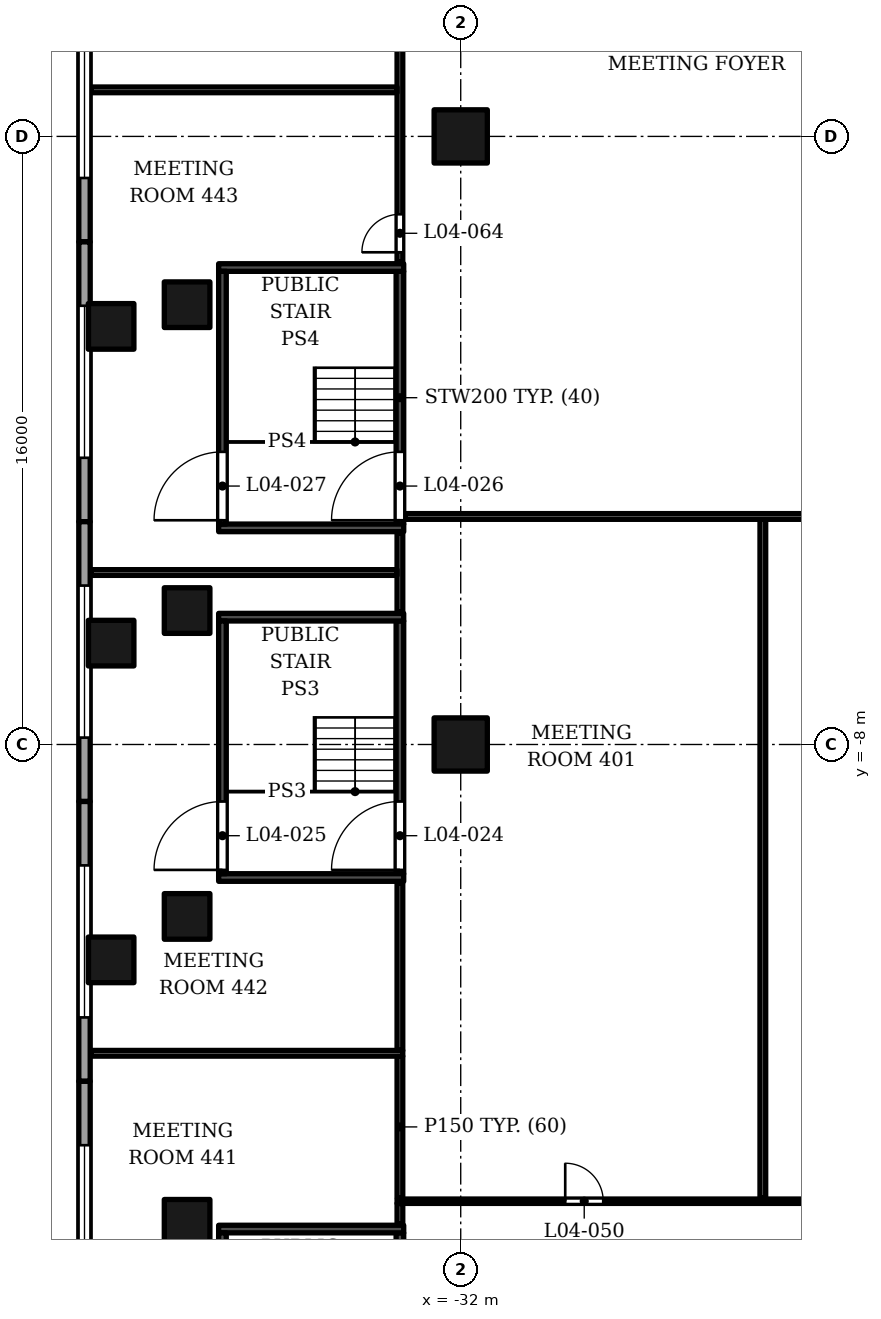
"""IFC4 building model, lengths in metres.
Left out: names, types, materials, properties, quantities, classifications, styles, units other than length and angle.
Written with IfcOpenShell. Run it as: python <this file> out.ifc"""

import sys

from ifc_helpers import new_model, si_unit, direction, frame, frame_2d, origin, origin_2d, place, context, subcontext, project, spatial, rectangle, extrude, element, fill, save


model = new_model("IFC4")
c1 = context("Model", 3, precision=1e-05, world=origin(), true_north=direction((0.0, 1.0)))
c2 = subcontext(c1, "Body", "Model", "MODEL_VIEW")
j1 = project(units=[si_unit("LENGTHUNIT", "METRE"), si_unit("PLANEANGLEUNIT", "RADIAN")], contexts=[c1])
p1 = place(None, origin())
s1 = spatial("IfcSite", under=j1, at=p1, CompositionType="ELEMENT")
p2 = place(p1, origin())
s2 = spatial("IfcBuilding", under=s1, at=p2, CompositionType="ELEMENT")
p3 = place(p2, frame((0.0, 0.0, 34.5)))
s3 = spatial("IfcBuildingStorey", under=s2, at=p3, CompositionType="ELEMENT", Elevation=34.5)
for number, where, z_axis, x_axis in (
    (1, (-32.0, -8.0, 0.0), (0.0, 0.0, 1.0), (1.0, 0.0, 0.0)),
    (2, (-32.0, 8.0, 0.0), (0.0, 0.0, 1.0), (1.0, 0.0, 0.0)),
):
    element("IfcColumn", number, at=place(p3, frame(where, z_axis=z_axis, x_axis=x_axis)), inside=s3, PredefinedType="COLUMN", context=c2, shape_type="SweptSolid", body=[
        extrude(rectangle(XDim=1.4, YDim=1.4, at=origin_2d()), origin(), (0.0, 0.0, 1.0), 5.5),
    ])
for number, where, z_axis, x_axis in (
    (3, (-39.2, -20.572, 0.0), (0.0, 0.0, 1.0), (1.0, 0.0, 0.0)),
    (4, (-39.2, -12.524, 0.0), (0.0, 0.0, 1.0), (1.0, 0.0, 0.0)),
    (5, (-39.2, -4.476, 0.0), (0.0, 0.0, 1.0), (1.0, 0.0, 0.0)),
    (6, (-39.2, 3.572, 0.0), (0.0, 0.0, 1.0), (1.0, 0.0, 0.0)),
    (7, (-41.2, -13.667, 0.0), (0.0, 0.0, 1.0), (1.0, 0.0, 0.0)),
    (8, (-41.2, -5.333, 0.0), (0.0, 0.0, 1.0), (1.0, 0.0, 0.0)),
    (9, (-41.2, 3.001, 0.0), (0.0, 0.0, 1.0), (1.0, 0.0, 0.0)),
):
    element("IfcColumn", number, at=place(p3, frame(where, z_axis=z_axis, x_axis=x_axis)), inside=s3, PredefinedType="COLUMN", context=c2, shape_type="SweptSolid", body=[
        extrude(rectangle(XDim=1.2, YDim=1.2, at=origin_2d()), origin(), (0.0, 0.0, 1.0), 5.5),
    ])
p4 = place(p3, frame((-41.9, 12.587, 0.0), z_axis=(0.0, 0.0, 1.0), x_axis=(0.0, -1.0, 0.0)))
e10 = element("IfcWall", 10, at=p4, inside=s3, PredefinedType="SOLIDWALL", context=c2, shape_type="SweptSolid", body=[
    extrude(rectangle(XDim=7.362, YDim=0.3, at=frame_2d((3.681, 0.0))), origin(), (0.0, 0.0, 1.0), 4.1),
])
p5 = place(p4, frame((1.681, 0.0, 1.0)))
e11 = element("IfcOpeningElement", 11, at=p5, cuts=e10, PredefinedType="OPENING", context=c2, shape_type="SweptSolid", body=[
    extrude(rectangle(XDim=4.0, YDim=1.8, at=frame_2d((2.0, 0.9))), frame((0.0, 0.16, 0.0), z_axis=(0.0, -1.0, 0.0), x_axis=(1.0, 0.0, 0.0)), (0.0, 0.0, 1.0), 0.32),
])
p6 = place(p3, frame((-41.9, 5.225, 0.0), z_axis=(0.0, 0.0, 1.0), x_axis=(0.0, -1.0, 0.0)))
e12 = element("IfcWall", 12, at=p6, inside=s3, PredefinedType="SOLIDWALL", context=c2, shape_type="SweptSolid", body=[
    extrude(rectangle(XDim=7.363, YDim=0.3, at=frame_2d((3.681, 0.0))), origin(), (0.0, 0.0, 1.0), 4.1),
])
p7 = place(p6, frame((1.681, 0.0, 1.0)))
e13 = element("IfcOpeningElement", 13, at=p7, cuts=e12, PredefinedType="OPENING", context=c2, shape_type="SweptSolid", body=[
    extrude(rectangle(XDim=4.0, YDim=1.8, at=frame_2d((2.0, 0.9))), frame((0.0, 0.16, 0.0), z_axis=(0.0, -1.0, 0.0), x_axis=(1.0, 0.0, 0.0)), (0.0, 0.0, 1.0), 0.32),
])
p8 = place(p3, frame((-41.9, -2.137, 0.0), z_axis=(0.0, 0.0, 1.0), x_axis=(0.0, -1.0, 0.0)))
e14 = element("IfcWall", 14, at=p8, inside=s3, PredefinedType="SOLIDWALL", context=c2, shape_type="SweptSolid", body=[
    extrude(rectangle(XDim=7.363, YDim=0.3, at=frame_2d((3.681, 0.0))), origin(), (0.0, 0.0, 1.0), 4.1),
])
p9 = place(p8, frame((1.681, 0.0, 1.0)))
e15 = element("IfcOpeningElement", 15, at=p9, cuts=e14, PredefinedType="OPENING", context=c2, shape_type="SweptSolid", body=[
    extrude(rectangle(XDim=4.0, YDim=1.8, at=frame_2d((2.0, 0.9))), frame((0.0, 0.16, 0.0), z_axis=(0.0, -1.0, 0.0), x_axis=(1.0, 0.0, 0.0)), (0.0, 0.0, 1.0), 0.32),
])
p10 = place(p3, frame((-41.9, -9.5, 0.0), z_axis=(0.0, 0.0, 1.0), x_axis=(0.0, -1.0, 0.0)))
e16 = element("IfcWall", 16, at=p10, inside=s3, PredefinedType="SOLIDWALL", context=c2, shape_type="SweptSolid", body=[
    extrude(rectangle(XDim=7.363, YDim=0.3, at=frame_2d((3.681, 0.0))), origin(), (0.0, 0.0, 1.0), 4.1),
])
p11 = place(p10, frame((1.681, 0.0, 1.0)))
e17 = element("IfcOpeningElement", 17, at=p11, cuts=e16, PredefinedType="OPENING", context=c2, shape_type="SweptSolid", body=[
    extrude(rectangle(XDim=4.0, YDim=1.8, at=frame_2d((2.0, 0.9))), frame((0.0, 0.16, 0.0), z_axis=(0.0, -1.0, 0.0), x_axis=(1.0, 0.0, 0.0)), (0.0, 0.0, 1.0), 0.32),
])
p12 = place(p3, frame((-41.9, -16.863, 0.0), z_axis=(0.0, 0.0, 1.0), x_axis=(0.0, -1.0, 0.0)))
e18 = element("IfcWall", 18, at=p12, inside=s3, PredefinedType="SOLIDWALL", context=c2, shape_type="SweptSolid", body=[
    extrude(rectangle(XDim=7.363, YDim=0.3, at=frame_2d((3.681, 0.0))), origin(), (0.0, 0.0, 1.0), 4.1),
])
p13 = place(p12, frame((1.681, 0.0, 1.0)))
e19 = element("IfcOpeningElement", 19, at=p13, cuts=e18, PredefinedType="OPENING", context=c2, shape_type="SweptSolid", body=[
    extrude(rectangle(XDim=4.0, YDim=1.8, at=frame_2d((2.0, 0.9))), frame((0.0, 0.16, 0.0), z_axis=(0.0, -1.0, 0.0), x_axis=(1.0, 0.0, 0.0)), (0.0, 0.0, 1.0), 0.32),
])
for number, where, z_axis, x_axis in (
    (20, (-41.85, 19.79, 5.5), (0.0, 0.0, 1.0), (0.0, -1.0, 0.0)),
    (21, (-41.85, 5.093, 5.5), (0.0, 0.0, 1.0), (0.0, -1.0, 0.0)),
    (22, (-41.85, -9.605, 5.5), (0.0, 0.0, 1.0), (0.0, -1.0, 0.0)),
):
    element("IfcWall", number, at=place(p3, frame(where, z_axis=z_axis, x_axis=x_axis)), inside=s3, PredefinedType="PARAPET", context=c2, shape_type="SweptSolid", body=[
        extrude(rectangle(XDim=14.698, YDim=0.3, at=frame_2d((7.349, 0.0))), origin(), (0.0, 0.0, 1.0), 1.1),
    ])
p14 = place(p3, frame((-38.37, -20.75, 0.0), z_axis=(0.0, 0.0, 1.0), x_axis=(1.0, 0.0, 0.0)))
e23 = element("IfcWall", 23, at=p14, inside=s3, PredefinedType="SOLIDWALL", context=c2, shape_type="SweptSolid", body=[
    extrude(rectangle(XDim=4.87, YDim=0.2, at=frame_2d((2.435, 0.0))), origin(), (0.0, 0.0, 1.0), 5.05),
])
p15 = place(p3, frame((-38.27, -27.5, 0.0), z_axis=(0.0, 0.0, 1.0), x_axis=(0.0, 1.0, 0.0)))
e24 = element("IfcWall", 24, at=p15, inside=s3, PredefinedType="SOLIDWALL", context=c2, shape_type="SweptSolid", body=[
    extrude(rectangle(XDim=6.65, YDim=0.2, at=frame_2d((3.325, 0.0))), origin(), (0.0, 0.0, 1.0), 5.05),
])
p16 = place(p15, frame((0.1, 0.0, 0.0)))
e25 = element("IfcOpeningElement", 25, at=p16, cuts=e24, PredefinedType="OPENING", context=c2, shape_type="SweptSolid", body=[
    extrude(rectangle(XDim=1.8, YDim=2.4, at=frame_2d((0.9, 1.2))), frame((0.0, 0.11, 0.0), z_axis=(0.0, -1.0, 0.0), x_axis=(1.0, 0.0, 0.0)), (0.0, 0.0, 1.0), 0.22),
])
p17 = place(p3, frame((-33.6, -27.5, 0.0), z_axis=(0.0, 0.0, 1.0), x_axis=(0.0, 1.0, 0.0)))
e26 = element("IfcWall", 26, at=p17, inside=s3, PredefinedType="SOLIDWALL", context=c2, shape_type="SweptSolid", body=[
    extrude(rectangle(XDim=6.65, YDim=0.2, at=frame_2d((3.325, 0.0))), origin(), (0.0, 0.0, 1.0), 5.05),
])
p18 = place(p17, frame((0.1, 0.0, 0.0)))
e27 = element("IfcOpeningElement", 27, at=p18, cuts=e26, PredefinedType="OPENING", context=c2, shape_type="SweptSolid", body=[
    extrude(rectangle(XDim=1.8, YDim=2.4, at=frame_2d((0.9, 1.2))), frame((0.0, 0.11, 0.0), z_axis=(0.0, -1.0, 0.0), x_axis=(1.0, 0.0, 0.0)), (0.0, 0.0, 1.0), 0.22),
])
for number, where, z_axis, x_axis in (
    (28, (-38.37, -11.5, 0.0), (0.0, 0.0, 1.0), (1.0, 0.0, 0.0)),
    (29, (-38.37, -4.65, 0.0), (0.0, 0.0, 1.0), (1.0, 0.0, 0.0)),
):
    element("IfcWall", number, at=place(p3, frame(where, z_axis=z_axis, x_axis=x_axis)), inside=s3, PredefinedType="SOLIDWALL", context=c2, shape_type="SweptSolid", body=[
        extrude(rectangle(XDim=4.87, YDim=0.2, at=frame_2d((2.435, 0.0))), origin(), (0.0, 0.0, 1.0), 5.05),
    ])
p19 = place(p3, frame((-38.27, -11.4, 0.0), z_axis=(0.0, 0.0, 1.0), x_axis=(0.0, 1.0, 0.0)))
e30 = element("IfcWall", 30, at=p19, inside=s3, PredefinedType="SOLIDWALL", context=c2, shape_type="SweptSolid", body=[
    extrude(rectangle(XDim=6.65, YDim=0.2, at=frame_2d((3.325, 0.0))), origin(), (0.0, 0.0, 1.0), 5.05),
])
p20 = place(p19, frame((0.1, 0.0, 0.0)))
e31 = element("IfcOpeningElement", 31, at=p20, cuts=e30, PredefinedType="OPENING", context=c2, shape_type="SweptSolid", body=[
    extrude(rectangle(XDim=1.8, YDim=2.4, at=frame_2d((0.9, 1.2))), frame((0.0, 0.11, 0.0), z_axis=(0.0, -1.0, 0.0), x_axis=(1.0, 0.0, 0.0)), (0.0, 0.0, 1.0), 0.22),
])
p21 = place(p3, frame((-33.6, -11.4, 0.0), z_axis=(0.0, 0.0, 1.0), x_axis=(0.0, 1.0, 0.0)))
e32 = element("IfcWall", 32, at=p21, inside=s3, PredefinedType="SOLIDWALL", context=c2, shape_type="SweptSolid", body=[
    extrude(rectangle(XDim=6.65, YDim=0.2, at=frame_2d((3.325, 0.0))), origin(), (0.0, 0.0, 1.0), 5.05),
])
p22 = place(p21, frame((0.1, 0.0, 0.0)))
e33 = element("IfcOpeningElement", 33, at=p22, cuts=e32, PredefinedType="OPENING", context=c2, shape_type="SweptSolid", body=[
    extrude(rectangle(XDim=1.8, YDim=2.4, at=frame_2d((0.9, 1.2))), frame((0.0, 0.11, 0.0), z_axis=(0.0, -1.0, 0.0), x_axis=(1.0, 0.0, 0.0)), (0.0, 0.0, 1.0), 0.22),
])
for number, where, z_axis, x_axis in (
    (34, (-38.37, -2.3, 0.0), (0.0, 0.0, 1.0), (1.0, 0.0, 0.0)),
    (35, (-38.37, 4.55, 0.0), (0.0, 0.0, 1.0), (1.0, 0.0, 0.0)),
):
    element("IfcWall", number, at=place(p3, frame(where, z_axis=z_axis, x_axis=x_axis)), inside=s3, PredefinedType="SOLIDWALL", context=c2, shape_type="SweptSolid", body=[
        extrude(rectangle(XDim=4.87, YDim=0.2, at=frame_2d((2.435, 0.0))), origin(), (0.0, 0.0, 1.0), 5.05),
    ])
p23 = place(p3, frame((-38.27, -2.2, 0.0), z_axis=(0.0, 0.0, 1.0), x_axis=(0.0, 1.0, 0.0)))
e36 = element("IfcWall", 36, at=p23, inside=s3, PredefinedType="SOLIDWALL", context=c2, shape_type="SweptSolid", body=[
    extrude(rectangle(XDim=6.65, YDim=0.2, at=frame_2d((3.325, 0.0))), origin(), (0.0, 0.0, 1.0), 5.05),
])
p24 = place(p23, frame((0.1, 0.0, 0.0)))
e37 = element("IfcOpeningElement", 37, at=p24, cuts=e36, PredefinedType="OPENING", context=c2, shape_type="SweptSolid", body=[
    extrude(rectangle(XDim=1.8, YDim=2.4, at=frame_2d((0.9, 1.2))), frame((0.0, 0.11, 0.0), z_axis=(0.0, -1.0, 0.0), x_axis=(1.0, 0.0, 0.0)), (0.0, 0.0, 1.0), 0.22),
])
p25 = place(p3, frame((-33.6, -2.2, 0.0), z_axis=(0.0, 0.0, 1.0), x_axis=(0.0, 1.0, 0.0)))
e38 = element("IfcWall", 38, at=p25, inside=s3, PredefinedType="SOLIDWALL", context=c2, shape_type="SweptSolid", body=[
    extrude(rectangle(XDim=6.65, YDim=0.2, at=frame_2d((3.325, 0.0))), origin(), (0.0, 0.0, 1.0), 5.05),
])
p26 = place(p25, frame((0.1, 0.0, 0.0)))
e39 = element("IfcOpeningElement", 39, at=p26, cuts=e38, PredefinedType="OPENING", context=c2, shape_type="SweptSolid", body=[
    extrude(rectangle(XDim=1.8, YDim=2.4, at=frame_2d((0.9, 1.2))), frame((0.0, 0.11, 0.0), z_axis=(0.0, -1.0, 0.0), x_axis=(1.0, 0.0, 0.0)), (0.0, 0.0, 1.0), 0.22),
])
p27 = place(p3, frame((-33.6, -20.61, 0.0), z_axis=(0.0, 0.0, 1.0), x_axis=(0.0, 1.0, 0.0)))
e40 = element("IfcWall", 40, at=p27, inside=s3, PredefinedType="PARTITIONING", context=c2, shape_type="SweptSolid", body=[
    extrude(rectangle(XDim=0.535, YDim=0.15, at=frame_2d((0.268, 0.0))), origin(), (0.0, 0.0, 1.0), 5.05),
])
p28 = place(p3, frame((-33.675, -20.018, 0.0), z_axis=(0.0, 0.0, 1.0), x_axis=(1.0, 0.0, 0.0)))
e41 = element("IfcWall", 41, at=p28, inside=s3, PredefinedType="PARTITIONING", context=c2, shape_type="SweptSolid", body=[
    extrude(rectangle(XDim=18.905, YDim=0.115, at=frame_2d((9.453, 0.0))), origin(), (0.0, 0.0, 1.0), 3.85),
])
p29 = place(p28, frame((4.425, 0.0, 0.0)))
e42 = element("IfcOpeningElement", 42, at=p29, cuts=e41, PredefinedType="OPENING", context=c2, shape_type="SweptSolid", body=[
    extrude(rectangle(XDim=1.0, YDim=2.1, at=frame_2d((0.5, 1.05))), frame((0.0, 0.067, 0.0), z_axis=(0.0, -1.0, 0.0), x_axis=(1.0, 0.0, 0.0)), (0.0, 0.0, 1.0), 0.135),
])
p30 = place(p3, frame((-33.6, -19.925, 0.0), z_axis=(0.0, 0.0, 1.0), x_axis=(0.0, 1.0, 0.0)))
e43 = element("IfcWall", 43, at=p30, inside=s3, PredefinedType="PARTITIONING", context=c2, shape_type="SweptSolid", body=[
    extrude(rectangle(XDim=3.725, YDim=0.15, at=frame_2d((1.863, 0.0))), origin(), (0.0, 0.0, 1.0), 5.05),
])
p31 = place(p3, frame((-24.05, -19.925, 0.0), z_axis=(0.0, 0.0, 1.0), x_axis=(0.0, 1.0, 0.0)))
e44 = element("IfcWall", 44, at=p31, inside=s3, PredefinedType="PARTITIONING", context=c2, shape_type="SweptSolid", body=[
    extrude(rectangle(XDim=17.85, YDim=0.15, at=frame_2d((8.925, 0.0))), origin(), (0.0, 0.0, 1.0), 3.85),
])
p32 = place(p3, frame((-41.72, -16.125, 0.0), z_axis=(0.0, 0.0, 1.0), x_axis=(1.0, 0.0, 0.0)))
e45 = element("IfcWall", 45, at=p32, inside=s3, PredefinedType="PARTITIONING", context=c2, shape_type="SweptSolid", body=[
    extrude(rectangle(XDim=8.195, YDim=0.15, at=frame_2d((4.098, 0.0))), origin(), (0.0, 0.0, 1.0), 4.15),
])
p33 = place(p3, frame((-33.6, -16.05, 0.0), z_axis=(0.0, 0.0, 1.0), x_axis=(0.0, 1.0, 0.0)))
e46 = element("IfcWall", 46, at=p33, inside=s3, PredefinedType="PARTITIONING", context=c2, shape_type="SweptSolid", body=[
    extrude(rectangle(XDim=4.41, YDim=0.15, at=frame_2d((2.205, 0.0))), origin(), (0.0, 0.0, 1.0), 5.05),
])
p34 = place(p3, frame((-33.6, -4.51, 0.0), z_axis=(0.0, 0.0, 1.0), x_axis=(0.0, 1.0, 0.0)))
e47 = element("IfcWall", 47, at=p34, inside=s3, PredefinedType="PARTITIONING", context=c2, shape_type="SweptSolid", body=[
    extrude(rectangle(XDim=2.07, YDim=0.15, at=frame_2d((1.035, 0.0))), origin(), (0.0, 0.0, 1.0), 5.05),
])
p35 = place(p3, frame((-41.72, -3.475, 0.0), z_axis=(0.0, 0.0, 1.0), x_axis=(1.0, 0.0, 0.0)))
e48 = element("IfcWall", 48, at=p35, inside=s3, PredefinedType="PARTITIONING", context=c2, shape_type="SweptSolid", body=[
    extrude(rectangle(XDim=8.045, YDim=0.15, at=frame_2d((4.022, 0.0))), origin(), (0.0, 0.0, 1.0), 4.15),
])
p36 = place(p3, frame((-33.46, -2.0, 0.0), z_axis=(0.0, 0.0, 1.0), x_axis=(1.0, 0.0, 0.0)))
e49 = element("IfcWall", 49, at=p36, inside=s3, PredefinedType="PARTITIONING", context=c2, shape_type="SweptSolid", body=[
    extrude(rectangle(XDim=66.92, YDim=0.15, at=frame_2d((33.46, 0.0))), origin(), (0.0, 0.0, 1.0), 3.85),
])
p37 = place(p36, frame((19.91, 0.0, 0.0)))
e50 = element("IfcOpeningElement", 50, at=p37, cuts=e49, PredefinedType="OPENING", context=c2, shape_type="SweptSolid", body=[
    extrude(rectangle(XDim=1.2, YDim=2.1, at=frame_2d((0.6, 1.05))), frame((0.0, 0.085, 0.0), z_axis=(0.0, -1.0, 0.0), x_axis=(1.0, 0.0, 0.0)), (0.0, 0.0, 1.0), 0.17),
])
p38 = place(p36, frame((45.91, 0.0, 0.0)))
e51 = element("IfcOpeningElement", 51, at=p38, cuts=e49, PredefinedType="OPENING", context=c2, shape_type="SweptSolid", body=[
    extrude(rectangle(XDim=1.2, YDim=2.1, at=frame_2d((0.6, 1.05))), frame((0.0, 0.085, 0.0), z_axis=(0.0, -1.0, 0.0), x_axis=(1.0, 0.0, 0.0)), (0.0, 0.0, 1.0), 0.17),
])
p39 = place(p36, frame((30.11, 0.0, 0.0)))
e52 = element("IfcOpeningElement", 52, at=p39, cuts=e49, PredefinedType="OPENING", context=c2, shape_type="SweptSolid", body=[
    extrude(rectangle(XDim=1.0, YDim=2.1, at=frame_2d((0.5, 1.05))), frame((0.0, 0.085, 0.0), z_axis=(0.0, -1.0, 0.0), x_axis=(1.0, 0.0, 0.0)), (0.0, 0.0, 1.0), 0.17),
])
p40 = place(p36, frame((35.86, 0.0, 0.0)))
e53 = element("IfcOpeningElement", 53, at=p40, cuts=e49, PredefinedType="OPENING", context=c2, shape_type="SweptSolid", body=[
    extrude(rectangle(XDim=1.0, YDim=2.1, at=frame_2d((0.5, 1.05))), frame((0.0, 0.085, 0.0), z_axis=(0.0, -1.0, 0.0), x_axis=(1.0, 0.0, 0.0)), (0.0, 0.0, 1.0), 0.17),
])
p41 = place(p3, frame((-33.6, 4.69, 0.0), z_axis=(0.0, 0.0, 1.0), x_axis=(0.0, 1.0, 0.0)))
e54 = element("IfcWall", 54, at=p41, inside=s3, PredefinedType="PARTITIONING", context=c2, shape_type="SweptSolid", body=[
    extrude(rectangle(XDim=9.07, YDim=0.15, at=frame_2d((4.535, 0.0))), origin(), (0.0, 0.0, 1.0), 3.85),
])
p42 = place(p41, frame((0.261, 0.0, 0.0)))
e55 = element("IfcOpeningElement", 55, at=p42, cuts=e54, PredefinedType="OPENING", context=c2, shape_type="SweptSolid", body=[
    extrude(rectangle(XDim=1.0, YDim=2.1, at=frame_2d((0.5, 1.05))), frame((0.0, 0.085, 0.0), z_axis=(0.0, -1.0, 0.0), x_axis=(1.0, 0.0, 0.0)), (0.0, 0.0, 1.0), 0.17),
])
p43 = place(p41, frame((5.885, 0.0, 0.0)))
e56 = element("IfcOpeningElement", 56, at=p43, cuts=e54, PredefinedType="OPENING", context=c2, shape_type="SweptSolid", body=[
    extrude(rectangle(XDim=1.0, YDim=2.1, at=frame_2d((0.5, 1.05))), frame((0.0, 0.085, 0.0), z_axis=(0.0, -1.0, 0.0), x_axis=(1.0, 0.0, 0.0)), (0.0, 0.0, 1.0), 0.17),
])
p44 = place(p3, frame((-41.72, 9.225, 0.0), z_axis=(0.0, 0.0, 1.0), x_axis=(1.0, 0.0, 0.0)))
e57 = element("IfcWall", 57, at=p44, inside=s3, PredefinedType="PARTITIONING", context=c2, shape_type="SweptSolid", body=[
    extrude(rectangle(XDim=8.045, YDim=0.15, at=frame_2d((4.022, 0.0))), origin(), (0.0, 0.0, 1.0), 4.15),
])
p45 = place(p5, origin())
e58 = element("IfcWindow", 58, at=p45, inside=s3, PartitioningType="SINGLE_PANEL", PredefinedType="WINDOW", context=c2, shape_type="SweptSolid", body=[
    extrude(rectangle(XDim=4.0, YDim=1.8, at=frame_2d((2.0, 0.9))), frame((0.0, 0.03, 0.0), z_axis=(0.0, -1.0, 0.0), x_axis=(1.0, 0.0, 0.0)), (0.0, 0.0, 1.0), 0.06),
])
fill(e11, e58)
p46 = place(p7, origin())
e59 = element("IfcWindow", 59, at=p46, inside=s3, PartitioningType="SINGLE_PANEL", PredefinedType="WINDOW", context=c2, shape_type="SweptSolid", body=[
    extrude(rectangle(XDim=4.0, YDim=1.8, at=frame_2d((2.0, 0.9))), frame((0.0, 0.03, 0.0), z_axis=(0.0, -1.0, 0.0), x_axis=(1.0, 0.0, 0.0)), (0.0, 0.0, 1.0), 0.06),
])
fill(e13, e59)
p47 = place(p9, origin())
e60 = element("IfcWindow", 60, at=p47, inside=s3, PartitioningType="SINGLE_PANEL", PredefinedType="WINDOW", context=c2, shape_type="SweptSolid", body=[
    extrude(rectangle(XDim=4.0, YDim=1.8, at=frame_2d((2.0, 0.9))), frame((0.0, 0.03, 0.0), z_axis=(0.0, -1.0, 0.0), x_axis=(1.0, 0.0, 0.0)), (0.0, 0.0, 1.0), 0.06),
])
fill(e15, e60)
p48 = place(p11, origin())
e61 = element("IfcWindow", 61, at=p48, inside=s3, PartitioningType="SINGLE_PANEL", PredefinedType="WINDOW", context=c2, shape_type="SweptSolid", body=[
    extrude(rectangle(XDim=4.0, YDim=1.8, at=frame_2d((2.0, 0.9))), frame((0.0, 0.03, 0.0), z_axis=(0.0, -1.0, 0.0), x_axis=(1.0, 0.0, 0.0)), (0.0, 0.0, 1.0), 0.06),
])
fill(e17, e61)
p49 = place(p13, origin())
e62 = element("IfcWindow", 62, at=p49, inside=s3, PartitioningType="SINGLE_PANEL", PredefinedType="WINDOW", context=c2, shape_type="SweptSolid", body=[
    extrude(rectangle(XDim=4.0, YDim=1.8, at=frame_2d((2.0, 0.9))), frame((0.0, 0.03, 0.0), z_axis=(0.0, -1.0, 0.0), x_axis=(1.0, 0.0, 0.0)), (0.0, 0.0, 1.0), 0.06),
])
fill(e19, e62)
p50 = place(p22, origin())
e63 = element("IfcDoor", 63, at=p50, inside=s3, OperationType="DOUBLE_DOOR_SINGLE_SWING", PredefinedType="DOOR", context=c2, shape_type="SweptSolid", body=[
    extrude(rectangle(XDim=1.8, YDim=2.4, at=frame_2d((0.9, 1.2))), frame((0.0, 0.025, 0.0), z_axis=(0.0, -1.0, 0.0), x_axis=(1.0, 0.0, 0.0)), (0.0, 0.0, 1.0), 0.05),
])
fill(e33, e63)
p51 = place(p20, origin())
e64 = element("IfcDoor", 64, at=p51, inside=s3, OperationType="DOUBLE_DOOR_SINGLE_SWING", PredefinedType="DOOR", context=c2, shape_type="SweptSolid", body=[
    extrude(rectangle(XDim=1.8, YDim=2.4, at=frame_2d((0.9, 1.2))), frame((0.0, 0.025, 0.0), z_axis=(0.0, -1.0, 0.0), x_axis=(1.0, 0.0, 0.0)), (0.0, 0.0, 1.0), 0.05),
])
fill(e31, e64)
p52 = place(p26, origin())
e65 = element("IfcDoor", 65, at=p52, inside=s3, OperationType="DOUBLE_DOOR_SINGLE_SWING", PredefinedType="DOOR", context=c2, shape_type="SweptSolid", body=[
    extrude(rectangle(XDim=1.8, YDim=2.4, at=frame_2d((0.9, 1.2))), frame((0.0, 0.025, 0.0), z_axis=(0.0, -1.0, 0.0), x_axis=(1.0, 0.0, 0.0)), (0.0, 0.0, 1.0), 0.05),
])
fill(e39, e65)
p53 = place(p24, origin())
e66 = element("IfcDoor", 66, at=p53, inside=s3, OperationType="DOUBLE_DOOR_SINGLE_SWING", PredefinedType="DOOR", context=c2, shape_type="SweptSolid", body=[
    extrude(rectangle(XDim=1.8, YDim=2.4, at=frame_2d((0.9, 1.2))), frame((0.0, 0.025, 0.0), z_axis=(0.0, -1.0, 0.0), x_axis=(1.0, 0.0, 0.0)), (0.0, 0.0, 1.0), 0.05),
])
fill(e37, e66)
p54 = place(p29, origin())
e67 = element("IfcDoor", 67, at=p54, inside=s3, OperationType="SINGLE_SWING_LEFT", PredefinedType="DOOR", context=c2, shape_type="SweptSolid", body=[
    extrude(rectangle(XDim=1.0, YDim=2.1, at=frame_2d((0.5, 1.05))), frame((0.0, 0.025, 0.0), z_axis=(0.0, -1.0, 0.0), x_axis=(1.0, 0.0, 0.0)), (0.0, 0.0, 1.0), 0.05),
])
fill(e42, e67)
p55 = place(p42, origin())
e68 = element("IfcDoor", 68, at=p55, inside=s3, OperationType="SINGLE_SWING_LEFT", PredefinedType="DOOR", context=c2, shape_type="SweptSolid", body=[
    extrude(rectangle(XDim=1.0, YDim=2.1, at=frame_2d((0.5, 1.05))), frame((0.0, 0.025, 0.0), z_axis=(0.0, -1.0, 0.0), x_axis=(1.0, 0.0, 0.0)), (0.0, 0.0, 1.0), 0.05),
])
fill(e55, e68)
save(model, sys.argv[1])
